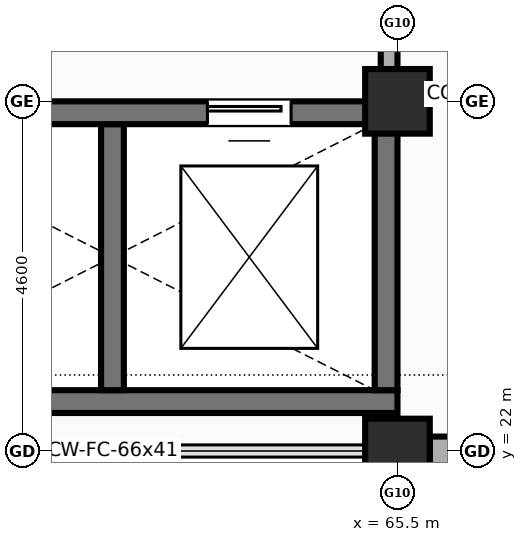
"""IFC4 building model, lengths in metres.
Left out: names, types, materials, properties, quantities, classifications, styles, units other than length and angle.
Written with IfcOpenShell. Run it as: python <this file> out.ifc"""

import sys

from ifc_helpers import new_model, si_unit, direction, frame, frame_2d, origin, origin_2d, place, context, subcontext, project, spatial, rectangle, extrude, element, fill, save


model = new_model("IFC4")
c1 = context("Model", 3, precision=1e-05, world=origin(), true_north=direction((0.0, 1.0)))
c2 = subcontext(c1, "Body", "Model", "MODEL_VIEW")
j1 = project(units=[si_unit("LENGTHUNIT", "METRE"), si_unit("PLANEANGLEUNIT", "RADIAN")], contexts=[c1])
p1 = place(None, origin())
s1 = spatial("IfcSite", under=j1, at=p1, CompositionType="ELEMENT")
p2 = place(p1, origin())
s2 = spatial("IfcBuilding", under=s1, at=p2, CompositionType="ELEMENT")
p3 = place(p2, origin())
s3 = spatial("IfcBuildingStorey", under=s2, at=p3, CompositionType="ELEMENT", Elevation=0.0)
for number, where, z_axis, x_axis in (
    (1, (65.5, 22.0, 0.0), (0.0, 0.0, 1.0), (1.0, 0.0, 0.0)),
    (2, (65.5, 26.6, 0.0), (0.0, 0.0, 1.0), (1.0, 0.0, 0.0)),
):
    element("IfcColumn", number, at=place(p3, frame(where, z_axis=z_axis, x_axis=x_axis)), inside=s3, PredefinedType="COLUMN", context=c2, shape_type="SweptSolid", body=[
        extrude(rectangle(XDim=0.85, YDim=0.85, at=origin_2d()), origin(), (0.0, 0.0, 1.0), 5.4),
    ])
p4 = place(p3, frame((58.0, 22.65, 0.0), z_axis=(0.0, 0.0, 1.0), x_axis=(1.0, 0.0, 0.0)))
e3 = element("IfcWall", 3, at=p4, inside=s3, PredefinedType="SHEAR", context=c2, shape_type="SweptSolid", body=[
    extrude(rectangle(XDim=7.5, YDim=0.3, at=frame_2d((3.75, 0.0))), origin(), (0.0, 0.0, 1.0), 5.4),
])
for number, where, z_axis, x_axis in (
    (4, (65.35, 22.8, 0.0), (0.0, 0.0, 1.0), (0.0, 1.0, 0.0)),
    (5, (61.75, 22.8, 0.0), (0.0, 0.0, 1.0), (0.0, 1.0, 0.0)),
):
    element("IfcWall", number, at=place(p3, frame(where, z_axis=z_axis, x_axis=x_axis)), inside=s3, PredefinedType="SHEAR", context=c2, shape_type="SweptSolid", body=[
        extrude(rectangle(XDim=3.5, YDim=0.3, at=frame_2d((1.75, 0.0))), origin(), (0.0, 0.0, 1.0), 5.4),
    ])
p5 = place(p3, frame((65.925, 22.0, 0.0), z_axis=(0.0, 0.0, 1.0), x_axis=(1.0, 0.0, 0.0)))
e6 = element("IfcWall", 6, at=p5, inside=s3, PredefinedType="SOLIDWALL", context=c2, shape_type="SweptSolid", body=[
    extrude(rectangle(XDim=6.475, YDim=0.38, at=frame_2d((3.237, 0.0))), origin(), (0.0, 0.0, 1.0), 4.15),
])
p6 = place(p5, frame((4.625, 0.0, 0.0), z_axis=(0.0, 0.0, 1.0), x_axis=(-1.0, 0.0, 0.0)))
e7 = element("IfcOpeningElement", 7, at=p6, cuts=e6, PredefinedType="OPENING", context=c2, shape_type="SweptSolid", body=[
    extrude(rectangle(XDim=2.6, YDim=2.9, at=frame_2d((1.3, 1.45))), frame((0.0, 0.2, 0.0), z_axis=(0.0, -1.0, 0.0), x_axis=(1.0, 0.0, 0.0)), (0.0, 0.0, 1.0), 0.4),
])
p7 = place(p3, frame((58.0, 26.45, 0.0), z_axis=(0.0, 0.0, 1.0), x_axis=(1.0, 0.0, 0.0)))
e8 = element("IfcWall", 8, at=p7, inside=s3, PredefinedType="SHEAR", context=c2, shape_type="SweptSolid", body=[
    extrude(rectangle(XDim=7.5, YDim=0.3, at=frame_2d((3.75, 0.0))), origin(), (0.0, 0.0, 1.0), 5.4),
])
p8 = place(p7, frame((1.4, 0.0, 0.0)))
e9 = element("IfcOpeningElement", 9, at=p8, cuts=e8, PredefinedType="OPENING", context=c2, shape_type="SweptSolid", body=[
    extrude(rectangle(XDim=1.1, YDim=2.15, at=frame_2d((0.55, 1.075))), frame((0.0, 0.16, 0.0), z_axis=(0.0, -1.0, 0.0), x_axis=(1.0, 0.0, 0.0)), (0.0, 0.0, 1.0), 0.32),
])
p9 = place(p7, frame((5.0, 0.0, 0.0)))
e10 = element("IfcOpeningElement", 10, at=p9, cuts=e8, PredefinedType="OPENING", context=c2, shape_type="SweptSolid", body=[
    extrude(rectangle(XDim=1.1, YDim=2.15, at=frame_2d((0.55, 1.075))), frame((0.0, 0.16, 0.0), z_axis=(0.0, -1.0, 0.0), x_axis=(1.0, 0.0, 0.0)), (0.0, 0.0, 1.0), 0.32),
])
p10 = place(p3, frame((65.39, 26.75, 0.0), z_axis=(0.0, 0.0, 1.0), x_axis=(0.0, 1.0, 0.0)))
e11 = element("IfcWall", 11, at=p10, inside=s3, PredefinedType="SOLIDWALL", context=c2, shape_type="SweptSolid", body=[
    extrude(rectangle(XDim=3.83, YDim=0.22, at=frame_2d((1.915, 0.0))), origin(), (0.0, 0.0, 1.0), 4.2),
])
p11 = place(p9, origin())
e12 = element("IfcDoor", 12, at=p11, inside=s3, OperationType="SLIDING_TO_LEFT", PredefinedType="DOOR", context=c2, shape_type="SweptSolid", body=[
    extrude(rectangle(XDim=1.1, YDim=2.15, at=frame_2d((0.55, 1.075))), frame((0.0, 0.025, 0.0), z_axis=(0.0, -1.0, 0.0), x_axis=(1.0, 0.0, 0.0)), (0.0, 0.0, 1.0), 0.05),
])
fill(e10, e12)
save(model, sys.argv[1])
